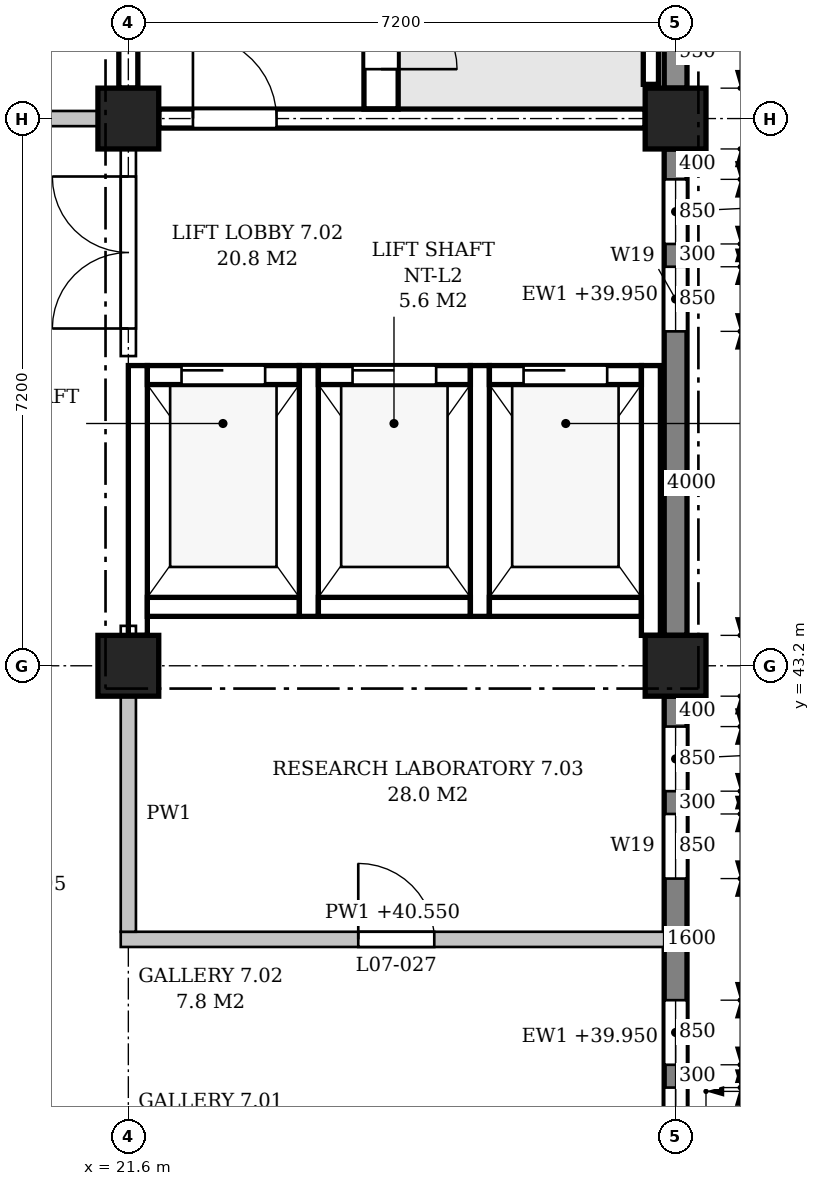
"""IFC4 building model, lengths in metres.
Left out: names, types, materials, properties, quantities, classifications, styles, units other than length and angle.
Written with IfcOpenShell. Run it as: python <this file> out.ifc"""

import sys

from ifc_helpers import new_model, si_unit, direction, frame, frame_2d, origin, origin_2d, place, context, subcontext, project, spatial, polyline, rectangle, outline, extrude, element, fill, save


model = new_model("IFC4")
c1 = context("Model", 3, precision=1e-05, world=origin(), true_north=direction((0.0, 1.0)))
c2 = subcontext(c1, "Body", "Model", "MODEL_VIEW")
j1 = project(units=[si_unit("LENGTHUNIT", "METRE"), si_unit("PLANEANGLEUNIT", "RADIAN")], contexts=[c1])
p1 = place(None, origin())
s1 = spatial("IfcSite", under=j1, at=p1, CompositionType="ELEMENT")
p2 = place(p1, origin())
s2 = spatial("IfcBuilding", under=s1, at=p2, CompositionType="ELEMENT")
p3 = place(p2, frame((0.0, 0.0, 36.0)))
s3 = spatial("IfcBuildingStorey", under=s2, at=p3, CompositionType="ELEMENT", Elevation=36.0)
for number, where, z_axis, x_axis in (
    (1, (21.6, 43.2, 0.0), (0.0, 0.0, 1.0), (1.0, 0.0, 0.0)),
    (2, (21.6, 50.4, 0.0), (0.0, 0.0, 1.0), (1.0, 0.0, 0.0)),
    (3, (28.8, 43.2, 0.0), (0.0, 0.0, 1.0), (1.0, 0.0, 0.0)),
    (4, (28.8, 50.4, 0.0), (0.0, 0.0, 1.0), (1.0, 0.0, 0.0)),
):
    element("IfcColumn", number, at=place(p3, frame(where, z_axis=z_axis, x_axis=x_axis)), inside=s3, PredefinedType="COLUMN", context=c2, shape_type="SweptSolid", body=[
        extrude(rectangle(XDim=0.8, YDim=0.8, at=origin_2d()), origin(), (0.0, 0.0, 1.0), 4.8),
    ])
p4 = place(p3, frame((28.8, 36.4, 0.0), z_axis=(0.0, 0.0, 1.0), x_axis=(0.0, 1.0, 0.0)))
e5 = element("IfcWall", 5, at=p4, inside=s3, PredefinedType="STANDARD", context=c2, shape_type="SweptSolid", body=[
    extrude(rectangle(XDim=6.4, YDim=0.3, at=frame_2d((3.2, 0.0))), origin(), (0.0, 0.0, 1.0), 3.95),
])
p5 = place(p4, frame((0.4, 0.0, 0.9)))
e6 = element("IfcOpeningElement", 6, at=p5, cuts=e5, PredefinedType="OPENING", context=c2, shape_type="SweptSolid", body=[
    extrude(outline(polyline([(0.0, 0.0), (0.85, 0.0), (0.85, 2.55), (0.425, 3.0), (0.0, 2.55), (0.0, 0.0)])), frame((0.0, 0.16, 0.0), z_axis=(0.0, -1.0, 0.0), x_axis=(1.0, 0.0, 0.0)), (0.0, 0.0, 1.0), 0.32),
])
p6 = place(p4, frame((1.55, 0.0, 0.9)))
e7 = element("IfcOpeningElement", 7, at=p6, cuts=e5, PredefinedType="OPENING", context=c2, shape_type="SweptSolid", body=[
    extrude(outline(polyline([(0.0, 0.0), (0.85, 0.0), (0.85, 2.55), (0.425, 3.0), (0.0, 2.55), (0.0, 0.0)])), frame((0.0, 0.16, 0.0), z_axis=(0.0, -1.0, 0.0), x_axis=(1.0, 0.0, 0.0)), (0.0, 0.0, 1.0), 0.32),
])
p7 = place(p4, frame((4.0, 0.0, 0.9)))
e8 = element("IfcOpeningElement", 8, at=p7, cuts=e5, PredefinedType="OPENING", context=c2, shape_type="SweptSolid", body=[
    extrude(outline(polyline([(0.0, 0.0), (0.85, 0.0), (0.85, 2.55), (0.425, 3.0), (0.0, 2.55), (0.0, 0.0)])), frame((0.0, 0.16, 0.0), z_axis=(0.0, -1.0, 0.0), x_axis=(1.0, 0.0, 0.0)), (0.0, 0.0, 1.0), 0.32),
])
p8 = place(p4, frame((5.15, 0.0, 0.9)))
e9 = element("IfcOpeningElement", 9, at=p8, cuts=e5, PredefinedType="OPENING", context=c2, shape_type="SweptSolid", body=[
    extrude(outline(polyline([(0.0, 0.0), (0.85, 0.0), (0.85, 2.55), (0.425, 3.0), (0.0, 2.55), (0.0, 0.0)])), frame((0.0, 0.16, 0.0), z_axis=(0.0, -1.0, 0.0), x_axis=(1.0, 0.0, 0.0)), (0.0, 0.0, 1.0), 0.32),
])
p9 = place(p3, frame((28.8, 43.6, 0.0), z_axis=(0.0, 0.0, 1.0), x_axis=(0.0, 1.0, 0.0)))
e10 = element("IfcWall", 10, at=p9, inside=s3, PredefinedType="STANDARD", context=c2, shape_type="SweptSolid", body=[
    extrude(rectangle(XDim=6.4, YDim=0.3, at=frame_2d((3.2, 0.0))), origin(), (0.0, 0.0, 1.0), 3.95),
])
p10 = place(p9, frame((4.0, 0.0, 0.9)))
e11 = element("IfcOpeningElement", 11, at=p10, cuts=e10, PredefinedType="OPENING", context=c2, shape_type="SweptSolid", body=[
    extrude(outline(polyline([(0.0, 0.0), (0.85, 0.0), (0.85, 2.55), (0.425, 3.0), (0.0, 2.55), (0.0, 0.0)])), frame((0.0, 0.16, 0.0), z_axis=(0.0, -1.0, 0.0), x_axis=(1.0, 0.0, 0.0)), (0.0, 0.0, 1.0), 0.32),
])
p11 = place(p9, frame((5.15, 0.0, 0.9)))
e12 = element("IfcOpeningElement", 12, at=p11, cuts=e10, PredefinedType="OPENING", context=c2, shape_type="SweptSolid", body=[
    extrude(outline(polyline([(0.0, 0.0), (0.85, 0.0), (0.85, 2.55), (0.425, 3.0), (0.0, 2.55), (0.0, 0.0)])), frame((0.0, 0.16, 0.0), z_axis=(0.0, -1.0, 0.0), x_axis=(1.0, 0.0, 0.0)), (0.0, 0.0, 1.0), 0.32),
])
p12 = place(p3, frame((28.8, 50.8, 0.0), z_axis=(0.0, 0.0, 1.0), x_axis=(0.0, 1.0, 0.0)))
e13 = element("IfcWall", 13, at=p12, inside=s3, PredefinedType="STANDARD", context=c2, shape_type="SweptSolid", body=[
    extrude(rectangle(XDim=6.4, YDim=0.3, at=frame_2d((3.2, 0.0))), origin(), (0.0, 0.0, 1.0), 3.95),
])
p13 = place(p12, frame((0.95, 0.0, 0.9)))
e14 = element("IfcOpeningElement", 14, at=p13, cuts=e13, PredefinedType="OPENING", context=c2, shape_type="SweptSolid", body=[
    extrude(outline(polyline([(0.0, 0.0), (0.9, 0.0), (0.9, 2.55), (0.45, 3.0), (0.0, 2.55), (0.0, 0.0)])), frame((0.0, 0.16, 0.0), z_axis=(0.0, -1.0, 0.0), x_axis=(1.0, 0.0, 0.0)), (0.0, 0.0, 1.0), 0.32),
])
p14 = place(p12, frame((4.55, 0.0, 0.9)))
e15 = element("IfcOpeningElement", 15, at=p14, cuts=e13, PredefinedType="OPENING", context=c2, shape_type="SweptSolid", body=[
    extrude(outline(polyline([(0.0, 0.0), (0.9, 0.0), (0.9, 2.55), (0.45, 3.0), (0.0, 2.55), (0.0, 0.0)])), frame((0.0, 0.16, 0.0), z_axis=(0.0, -1.0, 0.0), x_axis=(1.0, 0.0, 0.0)), (0.0, 0.0, 1.0), 0.32),
])
p15 = place(p3, frame((22.0, 50.4, 0.0), z_axis=(0.0, 0.0, 1.0), x_axis=(1.0, 0.0, 0.0)))
e16 = element("IfcWall", 16, at=p15, inside=s3, PredefinedType="SHEAR", context=c2, shape_type="SweptSolid", body=[
    extrude(rectangle(XDim=6.4, YDim=0.25, at=frame_2d((3.2, 0.0))), origin(), (0.0, 0.0, 1.0), 3.85),
])
p16 = place(p15, frame((0.45, 0.0, 0.0)))
e17 = element("IfcOpeningElement", 17, at=p16, cuts=e16, PredefinedType="OPENING", context=c2, shape_type="SweptSolid", body=[
    extrude(rectangle(XDim=1.1, YDim=2.1, at=frame_2d((0.55, 1.05))), frame((0.0, 0.135, 0.0), z_axis=(0.0, -1.0, 0.0), x_axis=(1.0, 0.0, 0.0)), (0.0, 0.0, 1.0), 0.27),
])
p17 = place(p3, frame((21.6, 50.8, 0.0), z_axis=(0.0, 0.0, 1.0), x_axis=(0.0, 1.0, 0.0)))
e18 = element("IfcWall", 18, at=p17, inside=s3, PredefinedType="SHEAR", context=c2, shape_type="SweptSolid", body=[
    extrude(rectangle(XDim=6.4, YDim=0.25, at=frame_2d((3.2, 0.0))), origin(), (0.0, 0.0, 1.0), 3.85),
])
p18 = place(p3, frame((28.475, 50.85, -0.25), z_axis=(0.0, 0.0, 1.0), x_axis=(0.0, 1.0, 0.0)))
e19 = element("IfcWall", 19, at=p18, inside=s3, PredefinedType="SHEAR", context=c2, shape_type="SweptSolid", body=[
    extrude(rectangle(XDim=0.9, YDim=0.2, at=frame_2d((0.45, 0.0))), origin(), (0.0, 0.0, 1.0), 4.8),
])
p19 = place(p3, frame((24.925, 50.525, 0.0), z_axis=(0.0, 0.0, 1.0), x_axis=(0.0, 1.0, 0.0)))
e20 = element("IfcWall", 20, at=p19, inside=s3, PredefinedType="SHEAR", context=c2, shape_type="SweptSolid", body=[
    extrude(rectangle(XDim=6.85, YDim=0.45, at=frame_2d((3.425, 0.0))), origin(), (0.0, 0.0, 1.0), 4.55),
])
p20 = place(p19, frame((0.525, 0.0, 0.0)))
e21 = element("IfcOpeningElement", 21, at=p20, cuts=e20, PredefinedType="OPENING", context=c2, shape_type="SweptSolid", body=[
    extrude(rectangle(XDim=1.0, YDim=2.1, at=frame_2d((0.5, 1.05))), frame((0.0, 0.235, 0.0), z_axis=(0.0, -1.0, 0.0), x_axis=(1.0, 0.0, 0.0)), (0.0, 0.0, 1.0), 0.47),
])
p21 = place(p3, frame((21.725, 43.6, -0.25), z_axis=(0.0, 0.0, 1.0), x_axis=(0.0, 1.0, 0.0)))
e22 = element("IfcWall", 22, at=p21, inside=s3, PredefinedType="SHEAR", context=c2, shape_type="SweptSolid", body=[
    extrude(rectangle(XDim=3.55, YDim=0.25, at=frame_2d((1.775, 0.0))), origin(), (0.0, 0.0, 1.0), 4.1),
])
for number, where, z_axis, x_axis in (
    (23, (23.975, 43.85, -0.25), (0.0, 0.0, 1.0), (0.0, 1.0, 0.0)),
    (24, (26.225, 43.85, -0.25), (0.0, 0.0, 1.0), (0.0, 1.0, 0.0)),
):
    element("IfcWall", number, at=place(p3, frame(where, z_axis=z_axis, x_axis=x_axis)), inside=s3, PredefinedType="SHEAR", context=c2, shape_type="SweptSolid", body=[
        extrude(rectangle(XDim=3.3, YDim=0.25, at=frame_2d((1.65, 0.0))), origin(), (0.0, 0.0, 1.0), 4.8),
    ])
p22 = place(p3, frame((28.475, 43.6, -0.25), z_axis=(0.0, 0.0, 1.0), x_axis=(0.0, 1.0, 0.0)))
e25 = element("IfcWall", 25, at=p22, inside=s3, PredefinedType="SHEAR", context=c2, shape_type="SweptSolid", body=[
    extrude(rectangle(XDim=3.55, YDim=0.25, at=frame_2d((1.775, 0.0))), origin(), (0.0, 0.0, 1.0), 4.8),
])
p23 = place(p3, frame((21.85, 47.025, -0.25), z_axis=(0.0, 0.0, 1.0), x_axis=(1.0, 0.0, 0.0)))
e26 = element("IfcWall", 26, at=p23, inside=s3, PredefinedType="SHEAR", context=c2, shape_type="SweptSolid", body=[
    extrude(rectangle(XDim=2.0, YDim=0.25, at=frame_2d((1.0, 0.0))), origin(), (0.0, 0.0, 1.0), 4.8),
])
p24 = place(p23, frame((0.45, 0.0, 0.25)))
e27 = element("IfcOpeningElement", 27, at=p24, cuts=e26, PredefinedType="OPENING", context=c2, shape_type="SweptSolid", body=[
    extrude(rectangle(XDim=1.1, YDim=2.1, at=frame_2d((0.55, 1.05))), frame((0.0, 0.135, 0.0), z_axis=(0.0, -1.0, 0.0), x_axis=(1.0, 0.0, 0.0)), (0.0, 0.0, 1.0), 0.27),
])
p25 = place(p3, frame((21.85, 43.975, -0.25), z_axis=(0.0, 0.0, 1.0), x_axis=(1.0, 0.0, 0.0)))
e28 = element("IfcWall", 28, at=p25, inside=s3, PredefinedType="SHEAR", context=c2, shape_type="SweptSolid", body=[
    extrude(rectangle(XDim=2.0, YDim=0.25, at=frame_2d((1.0, 0.0))), origin(), (0.0, 0.0, 1.0), 4.8),
])
p26 = place(p3, frame((24.1, 47.025, -0.25), z_axis=(0.0, 0.0, 1.0), x_axis=(1.0, 0.0, 0.0)))
e29 = element("IfcWall", 29, at=p26, inside=s3, PredefinedType="SHEAR", context=c2, shape_type="SweptSolid", body=[
    extrude(rectangle(XDim=2.0, YDim=0.25, at=frame_2d((1.0, 0.0))), origin(), (0.0, 0.0, 1.0), 4.8),
])
p27 = place(p26, frame((0.45, 0.0, 0.25)))
e30 = element("IfcOpeningElement", 30, at=p27, cuts=e29, PredefinedType="OPENING", context=c2, shape_type="SweptSolid", body=[
    extrude(rectangle(XDim=1.1, YDim=2.1, at=frame_2d((0.55, 1.05))), frame((0.0, 0.135, 0.0), z_axis=(0.0, -1.0, 0.0), x_axis=(1.0, 0.0, 0.0)), (0.0, 0.0, 1.0), 0.27),
])
p28 = place(p3, frame((24.1, 43.975, -0.25), z_axis=(0.0, 0.0, 1.0), x_axis=(1.0, 0.0, 0.0)))
e31 = element("IfcWall", 31, at=p28, inside=s3, PredefinedType="SHEAR", context=c2, shape_type="SweptSolid", body=[
    extrude(rectangle(XDim=2.0, YDim=0.25, at=frame_2d((1.0, 0.0))), origin(), (0.0, 0.0, 1.0), 4.8),
])
p29 = place(p3, frame((26.35, 47.025, -0.25), z_axis=(0.0, 0.0, 1.0), x_axis=(1.0, 0.0, 0.0)))
e32 = element("IfcWall", 32, at=p29, inside=s3, PredefinedType="SHEAR", context=c2, shape_type="SweptSolid", body=[
    extrude(rectangle(XDim=2.0, YDim=0.25, at=frame_2d((1.0, 0.0))), origin(), (0.0, 0.0, 1.0), 4.8),
])
p30 = place(p29, frame((0.45, 0.0, 0.25)))
e33 = element("IfcOpeningElement", 33, at=p30, cuts=e32, PredefinedType="OPENING", context=c2, shape_type="SweptSolid", body=[
    extrude(rectangle(XDim=1.1, YDim=2.1, at=frame_2d((0.55, 1.05))), frame((0.0, 0.135, 0.0), z_axis=(0.0, -1.0, 0.0), x_axis=(1.0, 0.0, 0.0)), (0.0, 0.0, 1.0), 0.27),
])
p31 = place(p3, frame((26.35, 43.975, -0.25), z_axis=(0.0, 0.0, 1.0), x_axis=(1.0, 0.0, 0.0)))
e34 = element("IfcWall", 34, at=p31, inside=s3, PredefinedType="SHEAR", context=c2, shape_type="SweptSolid", body=[
    extrude(rectangle(XDim=2.0, YDim=0.25, at=frame_2d((1.0, 0.0))), origin(), (0.0, 0.0, 1.0), 4.8),
])
p32 = place(p3, frame((21.5, 39.6, 0.0), z_axis=(0.0, 0.0, 1.0), x_axis=(1.0, 0.0, 0.0)))
e35 = element("IfcWall", 35, at=p32, inside=s3, PredefinedType="PARTITIONING", context=c2, shape_type="SweptSolid", body=[
    extrude(outline(polyline([(0.0, 0.0), (7.15, 0.0), (7.1, 4.55), (0.325, 4.55), (0.325, 3.85), (0.0, 3.85), (0.0, 0.0)])), frame((0.0, 0.1, 0.0), z_axis=(0.0, -1.0, 0.0), x_axis=(1.0, 0.0, 0.0)), (0.0, 0.0, 1.0), 0.2),
])
p33 = place(p32, frame((3.125, 0.0, 0.0)))
e36 = element("IfcOpeningElement", 36, at=p33, cuts=e35, PredefinedType="OPENING", context=c2, shape_type="SweptSolid", body=[
    extrude(rectangle(XDim=1.0, YDim=2.1, at=frame_2d((0.5, 1.05))), frame((0.0, 0.11, 0.0), z_axis=(0.0, -1.0, 0.0), x_axis=(1.0, 0.0, 0.0)), (0.0, 0.0, 1.0), 0.22),
])
p34 = place(p3, frame((14.8, 50.4, 0.0), z_axis=(0.0, 0.0, 1.0), x_axis=(1.0, 0.0, 0.0)))
e37 = element("IfcWall", 37, at=p34, inside=s3, PredefinedType="PARTITIONING", context=c2, shape_type="SweptSolid", body=[
    extrude(rectangle(XDim=6.4, YDim=0.2, at=frame_2d((3.2, 0.0))), origin(), (0.0, 0.0, 1.0), 3.85),
])
p35 = place(p34, frame((4.3, 0.0, 0.0)))
e38 = element("IfcOpeningElement", 38, at=p35, cuts=e37, PredefinedType="OPENING", context=c2, shape_type="SweptSolid", body=[
    extrude(rectangle(XDim=1.0, YDim=2.1, at=frame_2d((0.5, 1.05))), frame((0.0, 0.11, 0.0), z_axis=(0.0, -1.0, 0.0), x_axis=(1.0, 0.0, 0.0)), (0.0, 0.0, 1.0), 0.22),
])
p36 = place(p3, frame((21.6, 39.7, 0.0), z_axis=(0.0, 0.0, 1.0), x_axis=(0.0, 1.0, 0.0)))
e39 = element("IfcWall", 39, at=p36, inside=s3, PredefinedType="PARTITIONING", context=c2, shape_type="SweptSolid", body=[
    extrude(rectangle(XDim=3.1, YDim=0.2, at=frame_2d((1.55, 0.0))), origin(), (0.0, 0.0, 1.0), 3.85),
])
p37 = place(p3, frame((21.6, 43.6, 0.0), z_axis=(0.0, 0.0, 1.0), x_axis=(0.0, 1.0, 0.0)))
e40 = element("IfcWall", 40, at=p37, inside=s3, PredefinedType="PARTITIONING", context=c2, shape_type="SweptSolid", body=[
    extrude(rectangle(XDim=0.125, YDim=0.2, at=frame_2d((0.062, 0.0))), origin(), (0.0, 0.0, 1.0), 3.85),
])
p38 = place(p3, frame((21.6, 47.275, 0.0), z_axis=(0.0, 0.0, 1.0), x_axis=(0.0, 1.0, 0.0)))
e41 = element("IfcWall", 41, at=p38, inside=s3, PredefinedType="PARTITIONING", context=c2, shape_type="SweptSolid", body=[
    extrude(rectangle(XDim=2.725, YDim=0.2, at=frame_2d((1.363, 0.0))), origin(), (0.0, 0.0, 1.0), 3.85),
])
p39 = place(p38, frame((0.363, 0.0, 0.0)))
e42 = element("IfcOpeningElement", 42, at=p39, cuts=e41, PredefinedType="OPENING", context=c2, shape_type="SweptSolid", body=[
    extrude(rectangle(XDim=2.0, YDim=2.4, at=frame_2d((1.0, 1.2))), frame((0.0, 0.11, 0.0), z_axis=(0.0, -1.0, 0.0), x_axis=(1.0, 0.0, 0.0)), (0.0, 0.0, 1.0), 0.22),
])
p40 = place(p5, origin())
e43 = element("IfcWindow", 43, at=p40, inside=s3, PartitioningType="SINGLE_PANEL", PredefinedType="WINDOW", context=c2, shape_type="SweptSolid", body=[
    extrude(outline(polyline([(0.0, 0.0), (0.85, 0.0), (0.85, 2.55), (0.425, 3.0), (0.0, 2.55), (0.0, 0.0)])), frame((0.0, 0.03, 0.0), z_axis=(0.0, -1.0, 0.0), x_axis=(1.0, 0.0, 0.0)), (0.0, 0.0, 1.0), 0.06),
])
fill(e6, e43)
p41 = place(p6, origin())
e44 = element("IfcWindow", 44, at=p41, inside=s3, PartitioningType="SINGLE_PANEL", PredefinedType="WINDOW", context=c2, shape_type="SweptSolid", body=[
    extrude(outline(polyline([(0.0, 0.0), (0.85, 0.0), (0.85, 2.55), (0.425, 3.0), (0.0, 2.55), (0.0, 0.0)])), frame((0.0, 0.03, 0.0), z_axis=(0.0, -1.0, 0.0), x_axis=(1.0, 0.0, 0.0)), (0.0, 0.0, 1.0), 0.06),
])
fill(e7, e44)
p42 = place(p7, origin())
e45 = element("IfcWindow", 45, at=p42, inside=s3, PartitioningType="SINGLE_PANEL", PredefinedType="WINDOW", context=c2, shape_type="SweptSolid", body=[
    extrude(outline(polyline([(0.0, 0.0), (0.85, 0.0), (0.85, 2.55), (0.425, 3.0), (0.0, 2.55), (0.0, 0.0)])), frame((0.0, 0.03, 0.0), z_axis=(0.0, -1.0, 0.0), x_axis=(1.0, 0.0, 0.0)), (0.0, 0.0, 1.0), 0.06),
])
fill(e8, e45)
p43 = place(p8, origin())
e46 = element("IfcWindow", 46, at=p43, inside=s3, PartitioningType="SINGLE_PANEL", PredefinedType="WINDOW", context=c2, shape_type="SweptSolid", body=[
    extrude(outline(polyline([(0.0, 0.0), (0.85, 0.0), (0.85, 2.55), (0.425, 3.0), (0.0, 2.55), (0.0, 0.0)])), frame((0.0, 0.03, 0.0), z_axis=(0.0, -1.0, 0.0), x_axis=(1.0, 0.0, 0.0)), (0.0, 0.0, 1.0), 0.06),
])
fill(e9, e46)
p44 = place(p10, origin())
e47 = element("IfcWindow", 47, at=p44, inside=s3, PartitioningType="SINGLE_PANEL", PredefinedType="WINDOW", context=c2, shape_type="SweptSolid", body=[
    extrude(outline(polyline([(0.0, 0.0), (0.85, 0.0), (0.85, 2.55), (0.425, 3.0), (0.0, 2.55), (0.0, 0.0)])), frame((0.0, 0.03, 0.0), z_axis=(0.0, -1.0, 0.0), x_axis=(1.0, 0.0, 0.0)), (0.0, 0.0, 1.0), 0.06),
])
fill(e11, e47)
p45 = place(p11, origin())
e48 = element("IfcWindow", 48, at=p45, inside=s3, PartitioningType="SINGLE_PANEL", PredefinedType="WINDOW", context=c2, shape_type="SweptSolid", body=[
    extrude(outline(polyline([(0.0, 0.0), (0.85, 0.0), (0.85, 2.55), (0.425, 3.0), (0.0, 2.55), (0.0, 0.0)])), frame((0.0, 0.03, 0.0), z_axis=(0.0, -1.0, 0.0), x_axis=(1.0, 0.0, 0.0)), (0.0, 0.0, 1.0), 0.06),
])
fill(e12, e48)
p46 = place(p20, frame((1.0, 0.0, 0.0), z_axis=(0.0, 0.0, 1.0), x_axis=(-1.0, 0.0, 0.0)))
e49 = element("IfcDoor", 49, at=p46, inside=s3, OperationType="SINGLE_SWING_RIGHT", PredefinedType="DOOR", context=c2, shape_type="SweptSolid", body=[
    extrude(rectangle(XDim=1.0, YDim=2.1, at=frame_2d((0.5, 1.05))), frame((0.0, 0.025, 0.0), z_axis=(0.0, -1.0, 0.0), x_axis=(1.0, 0.0, 0.0)), (0.0, 0.0, 1.0), 0.05),
])
fill(e21, e49)
p47 = place(p16, origin())
e50 = element("IfcDoor", 50, at=p47, inside=s3, OperationType="SINGLE_SWING_LEFT", PredefinedType="DOOR", context=c2, shape_type="SweptSolid", body=[
    extrude(rectangle(XDim=1.1, YDim=2.1, at=frame_2d((0.55, 1.05))), frame((0.0, 0.025, 0.0), z_axis=(0.0, -1.0, 0.0), x_axis=(1.0, 0.0, 0.0)), (0.0, 0.0, 1.0), 0.05),
])
fill(e17, e50)
p48 = place(p24, origin())
e51 = element("IfcDoor", 51, at=p48, inside=s3, OperationType="SLIDING_TO_LEFT", PredefinedType="DOOR", context=c2, shape_type="SweptSolid", body=[
    extrude(rectangle(XDim=1.1, YDim=2.1, at=frame_2d((0.55, 1.05))), frame((0.0, 0.025, 0.0), z_axis=(0.0, -1.0, 0.0), x_axis=(1.0, 0.0, 0.0)), (0.0, 0.0, 1.0), 0.05),
])
fill(e27, e51)
p49 = place(p27, origin())
e52 = element("IfcDoor", 52, at=p49, inside=s3, OperationType="SLIDING_TO_LEFT", PredefinedType="DOOR", context=c2, shape_type="SweptSolid", body=[
    extrude(rectangle(XDim=1.1, YDim=2.1, at=frame_2d((0.55, 1.05))), frame((0.0, 0.025, 0.0), z_axis=(0.0, -1.0, 0.0), x_axis=(1.0, 0.0, 0.0)), (0.0, 0.0, 1.0), 0.05),
])
fill(e30, e52)
p50 = place(p30, origin())
e53 = element("IfcDoor", 53, at=p50, inside=s3, OperationType="SLIDING_TO_LEFT", PredefinedType="DOOR", context=c2, shape_type="SweptSolid", body=[
    extrude(rectangle(XDim=1.1, YDim=2.1, at=frame_2d((0.55, 1.05))), frame((0.0, 0.025, 0.0), z_axis=(0.0, -1.0, 0.0), x_axis=(1.0, 0.0, 0.0)), (0.0, 0.0, 1.0), 0.05),
])
fill(e33, e53)
p51 = place(p39, origin())
e54 = element("IfcDoor", 54, at=p51, inside=s3, OperationType="DOUBLE_DOOR_SINGLE_SWING", PredefinedType="DOOR", context=c2, shape_type="SweptSolid", body=[
    extrude(rectangle(XDim=2.0, YDim=2.4, at=frame_2d((1.0, 1.2))), frame((0.0, 0.025, 0.0), z_axis=(0.0, -1.0, 0.0), x_axis=(1.0, 0.0, 0.0)), (0.0, 0.0, 1.0), 0.05),
])
fill(e42, e54)
p52 = place(p33, origin())
e55 = element("IfcDoor", 55, at=p52, inside=s3, OperationType="SINGLE_SWING_LEFT", PredefinedType="DOOR", context=c2, shape_type="SweptSolid", body=[
    extrude(rectangle(XDim=1.0, YDim=2.1, at=frame_2d((0.5, 1.05))), frame((0.0, 0.025, 0.0), z_axis=(0.0, -1.0, 0.0), x_axis=(1.0, 0.0, 0.0)), (0.0, 0.0, 1.0), 0.05),
])
fill(e36, e55)
save(model, sys.argv[1])
